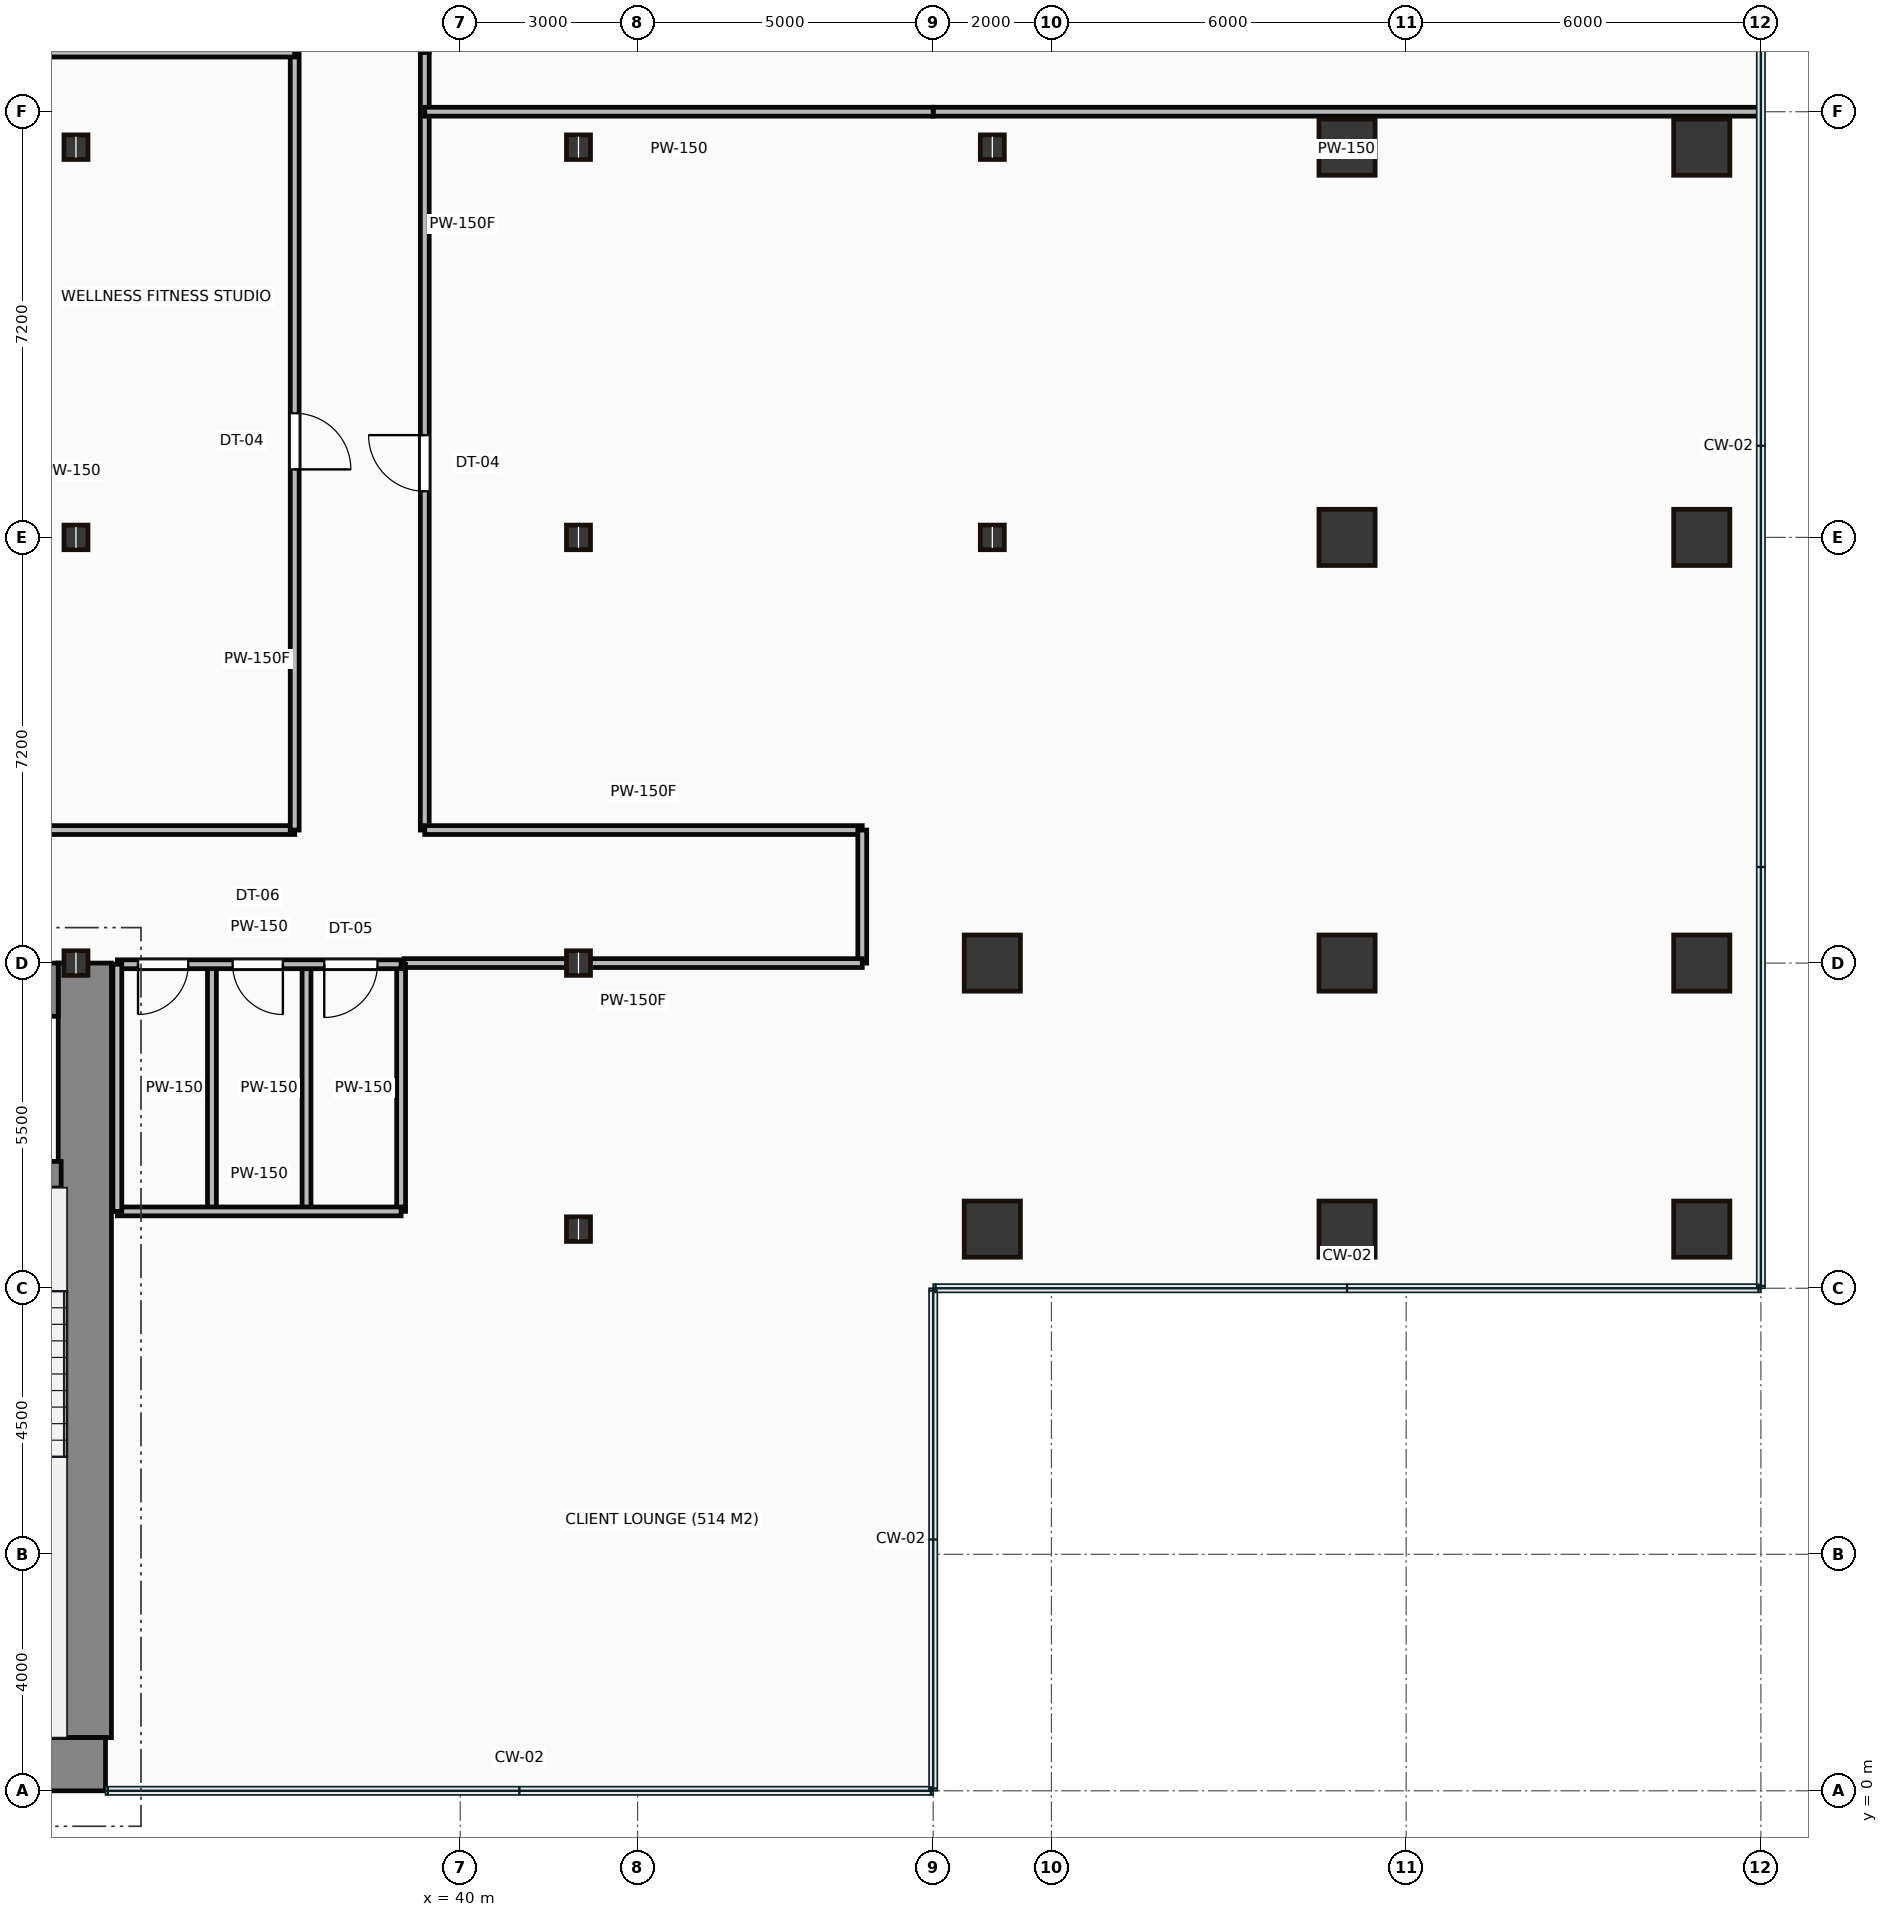
"""IFC4 building model, lengths in metres.
Left out: names, types, materials, properties, quantities, classifications, styles, units other than length and angle.
Written with IfcOpenShell. Run it as: python <this file> out.ifc"""

import sys

from ifc_helpers import new_model, si_unit, direction, frame, frame_2d, origin, origin_2d, place, context, subcontext, project, spatial, rectangle, hollow_rectangle, i_section, extrude, source, transform, mapped, element, fill, save


model = new_model("IFC4")
c1 = context("Model", 3, precision=1e-05, world=origin(), true_north=direction((0.0, 1.0)))
c2 = subcontext(c1, "Body", "Model", "MODEL_VIEW")
j1 = project(units=[si_unit("LENGTHUNIT", "METRE"), si_unit("PLANEANGLEUNIT", "RADIAN")], contexts=[c1])
p1 = place(None, origin())
s1 = spatial("IfcSite", under=j1, at=p1, CompositionType="ELEMENT")
p2 = place(p1, origin())
s2 = spatial("IfcBuilding", under=s1, at=p2, CompositionType="ELEMENT")
p3 = place(p2, frame((0.0, 0.0, 54.4)))
s3 = spatial("IfcBuildingStorey", under=s2, at=p3, CompositionType="ELEMENT", Elevation=54.4)
m1 = source(origin(), c2, "Body", "SweptSolid", [
    extrude(rectangle(XDim=29.5, YDim=0.9, at=frame_2d((14.75, 0.0))), origin(), (0.0, 0.0, 1.0), 3.65),
])
p4 = place(p3, frame((4.5, 0.45, 0.0), z_axis=(0.0, 0.0, 1.0), x_axis=(1.0, 0.0, 0.0)))
e1 = element("IfcWall", 1, at=p4, inside=s3, PredefinedType="SHEAR", context=c2, shape_type="MappedRepresentation", body=[
    mapped(m1, transform((0.0, 0.0, 0.0))),
])
m2 = source(origin(), c2, "Body", "SweptSolid", [
    extrude(rectangle(XDim=13.1, YDim=0.9, at=frame_2d((6.55, 0.0))), origin(), (0.0, 0.0, 1.0), 3.65),
])
p5 = place(p3, frame((33.65, 0.9, 0.0), z_axis=(0.0, 0.0, 1.0), x_axis=(0.0, 1.0, 0.0)))
e2 = element("IfcWall", 2, at=p5, inside=s3, PredefinedType="SHEAR", context=c2, shape_type="MappedRepresentation", body=[
    mapped(m2, transform((0.0, 0.0, 0.0))),
])
m3 = source(origin(), c2, "Body", "SweptSolid", [
    extrude(rectangle(XDim=12.6, YDim=0.9, at=frame_2d((6.3, 0.0))), origin(), (0.0, 0.0, 1.0), 3.65),
])
p6 = place(p3, frame((20.6, 13.55, 0.0), z_axis=(0.0, 0.0, 1.0), x_axis=(1.0, 0.0, 0.0)))
e3 = element("IfcWall", 3, at=p6, inside=s3, PredefinedType="SHEAR", context=c2, shape_type="MappedRepresentation", body=[
    mapped(m3, transform((0.0, 0.0, 0.0))),
])
p7 = place(p6, frame((9.25, 0.0, 0.0)))
e4 = element("IfcOpeningElement", 4, at=p7, cuts=e3, PredefinedType="OPENING", context=c2, shape_type="SweptSolid", body=[
    extrude(rectangle(XDim=1.1, YDim=2.15, at=frame_2d((0.55, 1.075))), frame((0.0, 0.46, 0.0), z_axis=(0.0, -1.0, 0.0), x_axis=(1.0, 0.0, 0.0)), (0.0, 0.0, 1.0), 0.92),
])
m4 = source(origin(), c2, "Body", "SweptSolid", [
    extrude(rectangle(XDim=3.39, YDim=0.45, at=frame_2d((1.695, 0.0))), origin(), (0.0, 0.0, 1.0), 3.65),
])
p8 = place(p3, frame((29.86, 10.42, 0.0), z_axis=(0.0, 0.0, 1.0), x_axis=(1.0, 0.0, 0.0)))
e5 = element("IfcWall", 5, at=p8, inside=s3, PredefinedType="SHEAR", context=c2, shape_type="MappedRepresentation", body=[
    mapped(m4, transform((0.0, 0.0, 0.0))),
])
p9 = place(p8, frame((1.1, 0.0, 0.0)))
e6 = element("IfcOpeningElement", 6, at=p9, cuts=e5, PredefinedType="OPENING", context=c2, shape_type="SweptSolid", body=[
    extrude(rectangle(XDim=1.1, YDim=2.15, at=frame_2d((0.55, 1.075))), frame((0.0, 0.235, 0.0), z_axis=(0.0, -1.0, 0.0), x_axis=(1.0, 0.0, 0.0)), (0.0, 0.0, 1.0), 0.47),
])
m5 = source(origin(), c2, "Body", "SweptSolid", [
    extrude(i_section(OverallWidth=0.406, OverallDepth=0.416, WebThickness=0.03, FlangeThickness=0.048, at=origin_2d()), origin(), (0.0, 0.0, 1.0), 3.65),
])
for number, where, z_axis, x_axis in (
    (7, (33.5, 14.0, 0.0), (0.0, 0.0, 1.0), (1.0, 0.0, 0.0)),
    (8, (33.5, 21.2, 0.0), (0.0, 0.0, 1.0), (1.0, 0.0, 0.0)),
    (9, (33.5, 27.8, 0.0), (0.0, 0.0, 1.0), (1.0, 0.0, 0.0)),
    (10, (42.0, 9.5, 0.0), (0.0, 0.0, 1.0), (1.0, 0.0, 0.0)),
    (11, (42.0, 14.0, 0.0), (0.0, 0.0, 1.0), (1.0, 0.0, 0.0)),
    (12, (42.0, 21.2, 0.0), (0.0, 0.0, 1.0), (1.0, 0.0, 0.0)),
    (13, (42.0, 27.8, 0.0), (0.0, 0.0, 1.0), (1.0, 0.0, 0.0)),
):
    element("IfcColumn", number, at=place(p3, frame(where, z_axis=z_axis, x_axis=x_axis)), inside=s3, PredefinedType="COLUMN", context=c2, shape_type="MappedRepresentation", body=[
        mapped(m5, transform((0.0, 0.0, 0.0))),
    ])
m6 = source(origin(), c2, "Body", "SweptSolid", [
    extrude(hollow_rectangle(XDim=0.95, YDim=0.95, WallThickness=0.045, at=origin_2d()), origin(), (0.0, 0.0, 1.0), 3.65),
])
for number, where, z_axis, x_axis in (
    (14, (49.0, 9.5, 0.0), (0.0, 0.0, 1.0), (1.0, 0.0, 0.0)),
    (15, (49.0, 14.0, 0.0), (0.0, 0.0, 1.0), (1.0, 0.0, 0.0)),
):
    element("IfcColumn", number, at=place(p3, frame(where, z_axis=z_axis, x_axis=x_axis)), inside=s3, PredefinedType="COLUMN", context=c2, shape_type="MappedRepresentation", body=[
        mapped(m6, transform((0.0, 0.0, 0.0))),
    ])
for number, where, z_axis, x_axis in (
    (16, (49.0, 21.2, 0.0), (0.0, 0.0, 1.0), (1.0, 0.0, 0.0)),
    (17, (49.0, 27.8, 0.0), (0.0, 0.0, 1.0), (1.0, 0.0, 0.0)),
):
    element("IfcColumn", number, at=place(p3, frame(where, z_axis=z_axis, x_axis=x_axis)), inside=s3, PredefinedType="COLUMN", context=c2, shape_type="MappedRepresentation", body=[
        mapped(m5, transform((0.0, 0.0, 0.0))),
    ])
for number, where, z_axis, x_axis in (
    (18, (55.0, 9.5, 0.0), (0.0, 0.0, 1.0), (1.0, 0.0, 0.0)),
    (19, (55.0, 14.0, 0.0), (0.0, 0.0, 1.0), (1.0, 0.0, 0.0)),
    (20, (55.0, 21.2, 0.0), (0.0, 0.0, 1.0), (1.0, 0.0, 0.0)),
    (21, (55.0, 27.8, 0.0), (0.0, 0.0, 1.0), (1.0, 0.0, 0.0)),
    (22, (61.0, 9.5, 0.0), (0.0, 0.0, 1.0), (1.0, 0.0, 0.0)),
    (23, (61.0, 14.0, 0.0), (0.0, 0.0, 1.0), (1.0, 0.0, 0.0)),
    (24, (61.0, 21.2, 0.0), (0.0, 0.0, 1.0), (1.0, 0.0, 0.0)),
    (25, (61.0, 27.8, 0.0), (0.0, 0.0, 1.0), (1.0, 0.0, 0.0)),
):
    element("IfcColumn", number, at=place(p3, frame(where, z_axis=z_axis, x_axis=x_axis)), inside=s3, PredefinedType="COLUMN", context=c2, shape_type="MappedRepresentation", body=[
        mapped(m6, transform((0.0, 0.0, 0.0))),
    ])
m7 = source(origin(), c2, "Body", "SweptSolid", [
    extrude(rectangle(XDim=4.8, YDim=0.15, at=frame_2d((2.4, 0.0))), origin(), (0.0, 0.0, 1.0), 2.625),
])
p10 = place(p3, frame((34.2, 13.98, 0.0), z_axis=(0.0, 0.0, 1.0), x_axis=(1.0, 0.0, 0.0)))
e26 = element("IfcWall", 26, at=p10, inside=s3, PredefinedType="PARTITIONING", context=c2, shape_type="MappedRepresentation", body=[
    mapped(m7, transform((0.0, 0.0, 0.0))),
])
p11 = place(p10, frame((0.35, 0.0, 0.0)))
e27 = element("IfcOpeningElement", 27, at=p11, cuts=e26, PredefinedType="OPENING", context=c2, shape_type="SweptSolid", body=[
    extrude(rectangle(XDim=0.85, YDim=2.1, at=frame_2d((0.425, 1.05))), frame((0.0, 0.085, 0.0), z_axis=(0.0, -1.0, 0.0), x_axis=(1.0, 0.0, 0.0)), (0.0, 0.0, 1.0), 0.17),
])
p12 = place(p10, frame((1.95, 0.0, 0.0)))
e28 = element("IfcOpeningElement", 28, at=p12, cuts=e26, PredefinedType="OPENING", context=c2, shape_type="SweptSolid", body=[
    extrude(rectangle(XDim=0.85, YDim=2.1, at=frame_2d((0.425, 1.05))), frame((0.0, 0.085, 0.0), z_axis=(0.0, -1.0, 0.0), x_axis=(1.0, 0.0, 0.0)), (0.0, 0.0, 1.0), 0.17),
])
p13 = place(p10, frame((3.5, 0.0, 0.0)))
e29 = element("IfcOpeningElement", 29, at=p13, cuts=e26, PredefinedType="OPENING", context=c2, shape_type="SweptSolid", body=[
    extrude(rectangle(XDim=0.9, YDim=2.1, at=frame_2d((0.45, 1.05))), frame((0.0, 0.085, 0.0), z_axis=(0.0, -1.0, 0.0), x_axis=(1.0, 0.0, 0.0)), (0.0, 0.0, 1.0), 0.17),
])
m8 = source(origin(), c2, "Body", "SweptSolid", [
    extrude(rectangle(XDim=4.8, YDim=0.15, at=frame_2d((2.4, 0.0))), origin(), (0.0, 0.0, 1.0), 3.4),
])
p14 = place(p3, frame((34.2, 9.8, 0.0), z_axis=(0.0, 0.0, 1.0), x_axis=(1.0, 0.0, 0.0)))
e30 = element("IfcWall", 30, at=p14, inside=s3, PredefinedType="PARTITIONING", context=c2, shape_type="MappedRepresentation", body=[
    mapped(m8, transform((0.0, 0.0, 0.0))),
])
m9 = source(origin(), c2, "Body", "SweptSolid", [
    extrude(rectangle(XDim=4.18, YDim=0.15, at=frame_2d((2.09, 0.0))), origin(), (0.0, 0.0, 1.0), 3.4),
])
for number, where, z_axis, x_axis in (
    (31, (39.0, 9.8, 0.0), (0.0, 0.0, 1.0), (0.0, 1.0, 0.0)),
    (32, (34.2, 9.8, 0.0), (0.0, 0.0, 1.0), (0.0, 1.0, 0.0)),
    (33, (35.8, 9.8, 0.0), (0.0, 0.0, 1.0), (0.0, 1.0, 0.0)),
    (34, (37.4, 9.8, 0.0), (0.0, 0.0, 1.0), (0.0, 1.0, 0.0)),
):
    element("IfcWall", number, at=place(p3, frame(where, z_axis=z_axis, x_axis=x_axis)), inside=s3, PredefinedType="PARTITIONING", context=c2, shape_type="MappedRepresentation", body=[
        mapped(m9, transform((0.0, 0.0, 0.0))),
    ])
m10 = source(origin(), c2, "Body", "SweptSolid", [
    extrude(rectangle(XDim=13.15, YDim=0.15, at=frame_2d((6.575, 0.0))), origin(), (0.0, 0.0, 1.0), 3.4),
])
p15 = place(p3, frame((39.4, 29.4, 0.0), z_axis=(0.0, 0.0, 1.0), x_axis=(0.0, -1.0, 0.0)))
e35 = element("IfcWall", 35, at=p15, inside=s3, PredefinedType="PARTITIONING", context=c2, shape_type="MappedRepresentation", body=[
    mapped(m10, transform((0.0, 0.0, 0.0))),
])
p16 = place(p15, frame((6.47, 0.0, 0.0)))
e36 = element("IfcOpeningElement", 36, at=p16, cuts=e35, PredefinedType="OPENING", context=c2, shape_type="SweptSolid", body=[
    extrude(rectangle(XDim=0.95, YDim=2.15, at=frame_2d((0.475, 1.075))), frame((0.0, 0.085, 0.0), z_axis=(0.0, -1.0, 0.0), x_axis=(1.0, 0.0, 0.0)), (0.0, 0.0, 1.0), 0.17),
])
m11 = source(origin(), c2, "Body", "SweptSolid", [
    extrude(rectangle(XDim=7.4, YDim=0.15, at=frame_2d((3.7, 0.0))), origin(), (0.0, 0.0, 1.0), 3.4),
])
p17 = place(p3, frame((39.4, 16.25, 0.0), z_axis=(0.0, 0.0, 1.0), x_axis=(1.0, 0.0, 0.0)))
e37 = element("IfcWall", 37, at=p17, inside=s3, PredefinedType="PARTITIONING", context=c2, shape_type="MappedRepresentation", body=[
    mapped(m11, transform((0.0, 0.0, 0.0))),
])
m12 = source(origin(), c2, "Body", "SweptSolid", [
    extrude(rectangle(XDim=2.25, YDim=0.15, at=frame_2d((1.125, 0.0))), origin(), (0.0, 0.0, 1.0), 3.4),
])
p18 = place(p3, frame((46.8, 16.25, 0.0), z_axis=(0.0, 0.0, 1.0), x_axis=(0.0, -1.0, 0.0)))
e38 = element("IfcWall", 38, at=p18, inside=s3, PredefinedType="PARTITIONING", context=c2, shape_type="MappedRepresentation", body=[
    mapped(m12, transform((0.0, 0.0, 0.0))),
])
m13 = source(origin(), c2, "Body", "SweptSolid", [
    extrude(rectangle(XDim=7.75, YDim=0.15, at=frame_2d((3.875, 0.0))), origin(), (0.0, 0.0, 1.0), 2.625),
])
p19 = place(p3, frame((46.8, 14.0, 0.0), z_axis=(0.0, 0.0, 1.0), x_axis=(-1.0, 0.0, 0.0)))
e39 = element("IfcWall", 39, at=p19, inside=s3, PredefinedType="PARTITIONING", context=c2, shape_type="MappedRepresentation", body=[
    mapped(m13, transform((0.0, 0.0, 0.0))),
])
m14 = source(origin(), c2, "Body", "SweptSolid", [
    extrude(rectangle(XDim=25.2, YDim=0.15, at=frame_2d((12.6, 0.0))), origin(), (0.0, 0.0, 1.0), 3.4),
])
p20 = place(p3, frame((12.0, 16.25, 0.0), z_axis=(0.0, 0.0, 1.0), x_axis=(1.0, 0.0, 0.0)))
e40 = element("IfcWall", 40, at=p20, inside=s3, PredefinedType="PARTITIONING", context=c2, shape_type="MappedRepresentation", body=[
    mapped(m14, transform((0.0, 0.0, 0.0))),
])
p21 = place(p20, frame((14.925, 0.0, 0.0)))
e41 = element("IfcOpeningElement", 41, at=p21, cuts=e40, PredefinedType="OPENING", context=c2, shape_type="SweptSolid", body=[
    extrude(rectangle(XDim=0.95, YDim=2.15, at=frame_2d((0.475, 1.075))), frame((0.0, 0.085, 0.0), z_axis=(0.0, -1.0, 0.0), x_axis=(1.0, 0.0, 0.0)), (0.0, 0.0, 1.0), 0.17),
])
p22 = place(p3, frame((37.2, 16.25, 0.0), z_axis=(0.0, 0.0, 1.0), x_axis=(0.0, 1.0, 0.0)))
e42 = element("IfcWall", 42, at=p22, inside=s3, PredefinedType="PARTITIONING", context=c2, shape_type="MappedRepresentation", body=[
    mapped(m10, transform((0.0, 0.0, 0.0))),
])
p23 = place(p22, frame((6.1, 0.0, 0.0)))
e43 = element("IfcOpeningElement", 43, at=p23, cuts=e42, PredefinedType="OPENING", context=c2, shape_type="SweptSolid", body=[
    extrude(rectangle(XDim=0.95, YDim=2.15, at=frame_2d((0.475, 1.075))), frame((0.0, 0.085, 0.0), z_axis=(0.0, -1.0, 0.0), x_axis=(1.0, 0.0, 0.0)), (0.0, 0.0, 1.0), 0.17),
])
p24 = place(p3, frame((37.2, 29.4, 0.0), z_axis=(0.0, 0.0, 1.0), x_axis=(-1.0, 0.0, 0.0)))
e44 = element("IfcWall", 44, at=p24, inside=s3, PredefinedType="PARTITIONING", context=c2, shape_type="MappedRepresentation", body=[
    mapped(m14, transform((0.0, 0.0, 0.0))),
])
m15 = source(origin(), c2, "Body", "SweptSolid", [
    extrude(rectangle(XDim=13.98, YDim=0.15, at=frame_2d((6.99, 0.0))), origin(), (0.0, 0.0, 1.0), 3.4),
])
p25 = place(p3, frame((61.98, 28.4, 0.0), z_axis=(0.0, 0.0, 1.0), x_axis=(-1.0, 0.0, 0.0)))
e45 = element("IfcWall", 45, at=p25, inside=s3, PredefinedType="PARTITIONING", context=c2, shape_type="MappedRepresentation", body=[
    mapped(m15, transform((0.0, 0.0, 0.0))),
])
m16 = source(origin(), c2, "Body", "SweptSolid", [
    extrude(rectangle(XDim=8.6, YDim=0.15, at=frame_2d((4.3, 0.0))), origin(), (0.0, 0.0, 1.0), 3.4),
])
p26 = place(p3, frame((48.0, 28.4, 0.0), z_axis=(0.0, 0.0, 1.0), x_axis=(-1.0, 0.0, 0.0)))
e46 = element("IfcWall", 46, at=p26, inside=s3, PredefinedType="PARTITIONING", context=c2, shape_type="MappedRepresentation", body=[
    mapped(m16, transform((0.0, 0.0, 0.0))),
])
m17 = source(origin(), c2, "Body", "SweptSolid", [
    extrude(rectangle(XDim=0.85, YDim=2.1, at=frame_2d((0.425, 1.05))), frame((0.0, 0.025, 0.0), z_axis=(0.0, -1.0, 0.0), x_axis=(1.0, 0.0, 0.0)), (0.0, 0.0, 1.0), 0.05),
])
p27 = place(p11, frame((0.85, 0.0, 0.0), z_axis=(0.0, 0.0, 1.0), x_axis=(-1.0, 0.0, 0.0)))
e47 = element("IfcDoor", 47, at=p27, inside=s3, OperationType="SINGLE_SWING_LEFT", PredefinedType="DOOR", context=c2, shape_type="MappedRepresentation", body=[
    mapped(m17, transform((0.0, 0.0, 0.0))),
])
fill(e27, e47)
p28 = place(p12, frame((0.85, 0.0, 0.0), z_axis=(0.0, 0.0, 1.0), x_axis=(-1.0, 0.0, 0.0)))
e48 = element("IfcDoor", 48, at=p28, inside=s3, OperationType="SINGLE_SWING_RIGHT", PredefinedType="DOOR", context=c2, shape_type="MappedRepresentation", body=[
    mapped(m17, transform((0.0, 0.0, 0.0))),
])
fill(e28, e48)
m18 = source(origin(), c2, "Body", "SweptSolid", [
    extrude(rectangle(XDim=0.9, YDim=2.1, at=frame_2d((0.45, 1.05))), frame((0.0, 0.025, 0.0), z_axis=(0.0, -1.0, 0.0), x_axis=(1.0, 0.0, 0.0)), (0.0, 0.0, 1.0), 0.05),
])
p29 = place(p13, frame((0.9, 0.0, 0.0), z_axis=(0.0, 0.0, 1.0), x_axis=(-1.0, 0.0, 0.0)))
e49 = element("IfcDoor", 49, at=p29, inside=s3, OperationType="SINGLE_SWING_LEFT", PredefinedType="DOOR", context=c2, shape_type="MappedRepresentation", body=[
    mapped(m18, transform((0.0, 0.0, 0.0))),
])
fill(e29, e49)
m19 = source(origin(), c2, "Body", "SweptSolid", [
    extrude(rectangle(XDim=0.95, YDim=2.15, at=frame_2d((0.475, 1.075))), frame((0.0, 0.025, 0.0), z_axis=(0.0, -1.0, 0.0), x_axis=(1.0, 0.0, 0.0)), (0.0, 0.0, 1.0), 0.05),
])
p30 = place(p23, origin())
e50 = element("IfcDoor", 50, at=p30, inside=s3, OperationType="SINGLE_SWING_LEFT", PredefinedType="DOOR", context=c2, shape_type="MappedRepresentation", body=[
    mapped(m19, transform((0.0, 0.0, 0.0))),
])
fill(e43, e50)
p31 = place(p16, origin())
e51 = element("IfcDoor", 51, at=p31, inside=s3, OperationType="SINGLE_SWING_LEFT", PredefinedType="DOOR", context=c2, shape_type="MappedRepresentation", body=[
    mapped(m19, transform((0.0, 0.0, 0.0))),
])
fill(e36, e51)
save(model, sys.argv[1])
